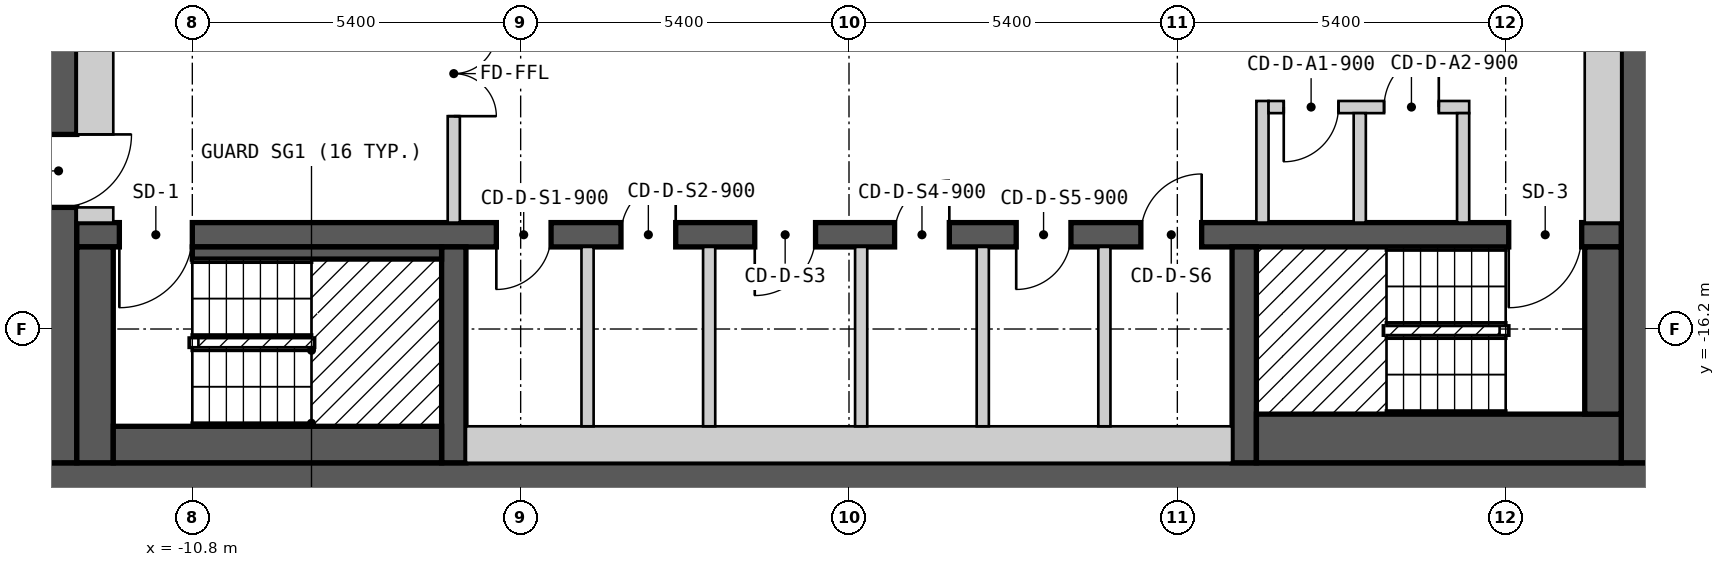
"""IFC4 building model, lengths in metres.
Left out: names, types, materials, properties, quantities, classifications, styles, units other than length and angle.
Written with IfcOpenShell. Run it as: python <this file> out.ifc"""

import sys

from ifc_helpers import new_model, si_unit, direction, frame, frame_2d, origin, place, context, subcontext, project, spatial, rectangle, extrude, element, fill, save


model = new_model("IFC4")
c1 = context("Model", 3, precision=1e-05, world=origin(), true_north=direction((0.0, 1.0)))
c2 = subcontext(c1, "Body", "Model", "MODEL_VIEW")
j1 = project(units=[si_unit("LENGTHUNIT", "METRE"), si_unit("PLANEANGLEUNIT", "RADIAN")], contexts=[c1])
p1 = place(None, origin())
s1 = spatial("IfcSite", under=j1, at=p1, CompositionType="ELEMENT")
p2 = place(p1, origin())
s2 = spatial("IfcBuilding", under=s1, at=p2, CompositionType="ELEMENT")
p3 = place(p2, frame((0.0, 0.0, 172.2)))
s3 = spatial("IfcBuildingStorey", under=s2, at=p3, CompositionType="ELEMENT", Elevation=172.2)
p4 = place(p3, frame((-13.3, -18.7, 0.0), z_axis=(0.0, 0.0, 1.0), x_axis=(1.0, 0.0, 0.0)))
e1 = element("IfcWall", 1, at=p4, inside=s3, PredefinedType="SHEAR", context=c2, shape_type="SweptSolid", body=[
    extrude(rectangle(XDim=26.6, YDim=0.6, at=frame_2d((13.3, 0.0))), origin(), (0.0, 0.0, 1.0), 2.7),
])
p5 = place(p3, frame((-13.0, -18.4, 0.0), z_axis=(0.0, 0.0, 1.0), x_axis=(0.0, 1.0, 0.0)))
e2 = element("IfcWall", 2, at=p5, inside=s3, PredefinedType="SHEAR", context=c2, shape_type="SweptSolid", body=[
    extrude(rectangle(XDim=12.8, YDim=0.6, at=frame_2d((6.4, 0.0))), origin(), (0.0, 0.0, 1.0), 2.7),
])
p6 = place(p5, frame((4.2, 0.0, 0.0)))
e3 = element("IfcOpeningElement", 3, at=p6, cuts=e2, PredefinedType="OPENING", context=c2, shape_type="SweptSolid", body=[
    extrude(rectangle(XDim=1.2, YDim=2.1, at=frame_2d((0.6, 1.05))), frame((0.0, 0.31, 0.0), z_axis=(0.0, -1.0, 0.0), x_axis=(1.0, 0.0, 0.0)), (0.0, 0.0, 1.0), 0.62),
])
p7 = place(p3, frame((13.0, -18.4, 0.0), z_axis=(0.0, 0.0, 1.0), x_axis=(0.0, 1.0, 0.0)))
e4 = element("IfcWall", 4, at=p7, inside=s3, PredefinedType="SHEAR", context=c2, shape_type="SweptSolid", body=[
    extrude(rectangle(XDim=12.8, YDim=0.6, at=frame_2d((6.4, 0.0))), origin(), (0.0, 0.0, 1.0), 2.7),
])
p8 = place(p3, frame((-12.7, -14.65, 0.0), z_axis=(0.0, 0.0, 1.0), x_axis=(1.0, 0.0, 0.0)))
e5 = element("IfcWall", 5, at=p8, inside=s3, PredefinedType="SHEAR", context=c2, shape_type="SweptSolid", body=[
    extrude(rectangle(XDim=25.4, YDim=0.4, at=frame_2d((12.7, 0.0))), origin(), (0.0, 0.0, 1.0), 2.7),
])
p9 = place(p8, frame((1.9, 0.0, 0.0), z_axis=(0.0, 0.0, 1.0), x_axis=(-1.0, 0.0, 0.0)))
e6 = element("IfcOpeningElement", 6, at=p9, cuts=e5, PredefinedType="OPENING", context=c2, shape_type="SweptSolid", body=[
    extrude(rectangle(XDim=1.2, YDim=2.1, at=frame_2d((0.6, 1.05))), frame((0.0, 0.21, 0.0), z_axis=(0.0, -1.0, 0.0), x_axis=(1.0, 0.0, 0.0)), (0.0, 0.0, 1.0), 0.42),
])
p10 = place(p8, frame((24.75, 0.0, 0.0), z_axis=(0.0, 0.0, 1.0), x_axis=(-1.0, 0.0, 0.0)))
e7 = element("IfcOpeningElement", 7, at=p10, cuts=e5, PredefinedType="OPENING", context=c2, shape_type="SweptSolid", body=[
    extrude(rectangle(XDim=1.2, YDim=2.1, at=frame_2d((0.6, 1.05))), frame((0.0, 0.21, 0.0), z_axis=(0.0, -1.0, 0.0), x_axis=(1.0, 0.0, 0.0)), (0.0, 0.0, 1.0), 0.42),
])
p11 = place(p8, frame((7.8, 0.0, 0.0), z_axis=(0.0, 0.0, 1.0), x_axis=(-1.0, 0.0, 0.0)))
e8 = element("IfcOpeningElement", 8, at=p11, cuts=e5, PredefinedType="OPENING", context=c2, shape_type="SweptSolid", body=[
    extrude(rectangle(XDim=0.9, YDim=2.1, at=frame_2d((0.45, 1.05))), frame((0.0, 0.21, 0.0), z_axis=(0.0, -1.0, 0.0), x_axis=(1.0, 0.0, 0.0)), (0.0, 0.0, 1.0), 0.42),
])
p12 = place(p8, frame((9.85, 0.0, 0.0), z_axis=(0.0, 0.0, 1.0), x_axis=(-1.0, 0.0, 0.0)))
e9 = element("IfcOpeningElement", 9, at=p12, cuts=e5, PredefinedType="OPENING", context=c2, shape_type="SweptSolid", body=[
    extrude(rectangle(XDim=0.9, YDim=2.1, at=frame_2d((0.45, 1.05))), frame((0.0, 0.21, 0.0), z_axis=(0.0, -1.0, 0.0), x_axis=(1.0, 0.0, 0.0)), (0.0, 0.0, 1.0), 0.42),
])
p13 = place(p8, frame((12.15, 0.0, 0.0), z_axis=(0.0, 0.0, 1.0), x_axis=(-1.0, 0.0, 0.0)))
e10 = element("IfcOpeningElement", 10, at=p13, cuts=e5, PredefinedType="OPENING", context=c2, shape_type="SweptSolid", body=[
    extrude(rectangle(XDim=1.0, YDim=2.1, at=frame_2d((0.5, 1.05))), frame((0.0, 0.21, 0.0), z_axis=(0.0, -1.0, 0.0), x_axis=(1.0, 0.0, 0.0)), (0.0, 0.0, 1.0), 0.42),
])
p14 = place(p8, frame((14.35, 0.0, 0.0), z_axis=(0.0, 0.0, 1.0), x_axis=(-1.0, 0.0, 0.0)))
e11 = element("IfcOpeningElement", 11, at=p14, cuts=e5, PredefinedType="OPENING", context=c2, shape_type="SweptSolid", body=[
    extrude(rectangle(XDim=0.9, YDim=2.1, at=frame_2d((0.45, 1.05))), frame((0.0, 0.21, 0.0), z_axis=(0.0, -1.0, 0.0), x_axis=(1.0, 0.0, 0.0)), (0.0, 0.0, 1.0), 0.42),
])
p15 = place(p8, frame((16.35, 0.0, 0.0), z_axis=(0.0, 0.0, 1.0), x_axis=(-1.0, 0.0, 0.0)))
e12 = element("IfcOpeningElement", 12, at=p15, cuts=e5, PredefinedType="OPENING", context=c2, shape_type="SweptSolid", body=[
    extrude(rectangle(XDim=0.9, YDim=2.1, at=frame_2d((0.45, 1.05))), frame((0.0, 0.21, 0.0), z_axis=(0.0, -1.0, 0.0), x_axis=(1.0, 0.0, 0.0)), (0.0, 0.0, 1.0), 0.42),
])
p16 = place(p8, frame((18.5, 0.0, 0.0), z_axis=(0.0, 0.0, 1.0), x_axis=(-1.0, 0.0, 0.0)))
e13 = element("IfcOpeningElement", 13, at=p16, cuts=e5, PredefinedType="OPENING", context=c2, shape_type="SweptSolid", body=[
    extrude(rectangle(XDim=1.0, YDim=2.1, at=frame_2d((0.5, 1.05))), frame((0.0, 0.21, 0.0), z_axis=(0.0, -1.0, 0.0), x_axis=(1.0, 0.0, 0.0)), (0.0, 0.0, 1.0), 0.42),
])
for number, where, z_axis, x_axis in (
    (14, (-6.5, -18.4, 0.0), (0.0, 0.0, 1.0), (0.0, 1.0, 0.0)),
    (15, (6.5, -18.4, 0.0), (0.0, 0.0, 1.0), (0.0, 1.0, 0.0)),
):
    element("IfcWall", number, at=place(p3, frame(where, z_axis=z_axis, x_axis=x_axis)), inside=s3, PredefinedType="SHEAR", context=c2, shape_type="SweptSolid", body=[
        extrude(rectangle(XDim=3.55, YDim=0.4, at=frame_2d((1.775, 0.0))), origin(), (0.0, 0.0, 1.0), 2.7),
    ])
p17 = place(p3, frame((-12.4, -18.4, 0.0), z_axis=(0.0, 0.0, 1.0), x_axis=(0.0, 1.0, 0.0)))
e16 = element("IfcWall", 16, at=p17, inside=s3, PredefinedType="SOLIDWALL", context=c2, shape_type="SweptSolid", body=[
    extrude(rectangle(XDim=3.55, YDim=0.6, at=frame_2d((1.775, 0.0))), origin(), (0.0, 0.0, 1.0), 2.7),
])
p18 = place(p3, frame((-12.7, -14.325, 0.0), z_axis=(0.0, 0.0, 1.0), x_axis=(1.0, 0.0, 0.0)))
e17 = element("IfcWall", 17, at=p18, inside=s3, PredefinedType="PARTITIONING", context=c2, shape_type="SweptSolid", body=[
    extrude(rectangle(XDim=0.6, YDim=0.25, at=frame_2d((0.3, 0.0))), origin(), (0.0, 0.0, 1.0), 2.7),
])
p19 = place(p3, frame((-12.4, -13.0, 0.0), z_axis=(0.0, 0.0, 1.0), x_axis=(0.0, 1.0, 0.0)))
e18 = element("IfcWall", 18, at=p19, inside=s3, PredefinedType="PARTITIONING", context=c2, shape_type="SweptSolid", body=[
    extrude(rectangle(XDim=3.45, YDim=0.6, at=frame_2d((1.725, 0.0))), origin(), (0.0, 0.0, 1.0), 2.7),
])
p20 = place(p3, frame((-12.1, -18.1, 0.0), z_axis=(0.0, 0.0, 1.0), x_axis=(1.0, 0.0, 0.0)))
e19 = element("IfcWall", 19, at=p20, inside=s3, PredefinedType="SOLIDWALL", context=c2, shape_type="SweptSolid", body=[
    extrude(rectangle(XDim=5.4, YDim=0.6, at=frame_2d((2.7, 0.0))), origin(), (0.0, 0.0, 1.0), 2.7),
])
p21 = place(p3, frame((-10.8, -14.95, 0.0), z_axis=(0.0, 0.0, 1.0), x_axis=(1.0, 0.0, 0.0)))
e20 = element("IfcWall", 20, at=p21, inside=s3, PredefinedType="SOLIDWALL", context=c2, shape_type="SweptSolid", body=[
    extrude(rectangle(XDim=4.1, YDim=0.2, at=frame_2d((2.05, 0.0))), origin(), (0.0, 0.0, 1.0), 2.7),
])
p22 = place(p3, frame((-6.5, -14.45, 0.0), z_axis=(0.0, 0.0, 1.0), x_axis=(0.0, 1.0, 0.0)))
e21 = element("IfcWall", 21, at=p22, inside=s3, PredefinedType="PARTITIONING", context=c2, shape_type="SweptSolid", body=[
    extrude(rectangle(XDim=4.9, YDim=0.2, at=frame_2d((2.45, 0.0))), origin(), (0.0, 0.0, 1.0), 2.7),
])
p23 = place(p22, frame((3.15, 0.0, 0.0), z_axis=(0.0, 0.0, 1.0), x_axis=(-1.0, 0.0, 0.0)))
e22 = element("IfcOpeningElement", 22, at=p23, cuts=e21, PredefinedType="OPENING", context=c2, shape_type="SweptSolid", body=[
    extrude(rectangle(XDim=1.4, YDim=2.1, at=frame_2d((0.7, 1.05))), frame((0.0, 0.11, 0.0), z_axis=(0.0, -1.0, 0.0), x_axis=(1.0, 0.0, 0.0)), (0.0, 0.0, 1.0), 0.22),
])
p24 = place(p3, frame((-6.3, -18.1, 0.0), z_axis=(0.0, 0.0, 1.0), x_axis=(1.0, 0.0, 0.0)))
e23 = element("IfcWall", 23, at=p24, inside=s3, PredefinedType="PARTITIONING", context=c2, shape_type="SweptSolid", body=[
    extrude(rectangle(XDim=12.6, YDim=0.6, at=frame_2d((6.3, 0.0))), origin(), (0.0, 0.0, 1.0), 2.7),
])
for number, where, z_axis, x_axis in (
    (24, (-4.3, -17.8, 0.0), (0.0, 0.0, 1.0), (0.0, 1.0, 0.0)),
    (25, (-2.3, -17.8, 0.0), (0.0, 0.0, 1.0), (0.0, 1.0, 0.0)),
    (26, (0.2, -17.8, 0.0), (0.0, 0.0, 1.0), (0.0, 1.0, 0.0)),
    (27, (2.2, -17.8, 0.0), (0.0, 0.0, 1.0), (0.0, 1.0, 0.0)),
    (28, (4.2, -17.8, 0.0), (0.0, 0.0, 1.0), (0.0, 1.0, 0.0)),
):
    element("IfcWall", number, at=place(p3, frame(where, z_axis=z_axis, x_axis=x_axis)), inside=s3, PredefinedType="PARTITIONING", context=c2, shape_type="SweptSolid", body=[
        extrude(rectangle(XDim=2.95, YDim=0.2, at=frame_2d((1.475, 0.0))), origin(), (0.0, 0.0, 1.0), 2.7),
    ])
p25 = place(p3, frame((6.7, -18.0, 0.0), z_axis=(0.0, 0.0, 1.0), x_axis=(1.0, 0.0, 0.0)))
e29 = element("IfcWall", 29, at=p25, inside=s3, PredefinedType="SOLIDWALL", context=c2, shape_type="SweptSolid", body=[
    extrude(rectangle(XDim=6.0, YDim=0.8, at=frame_2d((3.0, 0.0))), origin(), (0.0, 0.0, 1.0), 2.7),
])
p26 = place(p3, frame((6.8, -14.45, 0.0), z_axis=(0.0, 0.0, 1.0), x_axis=(0.0, 1.0, 0.0)))
e30 = element("IfcWall", 30, at=p26, inside=s3, PredefinedType="PARTITIONING", context=c2, shape_type="SweptSolid", body=[
    extrude(rectangle(XDim=2.0, YDim=0.2, at=frame_2d((1.0, 0.0))), origin(), (0.0, 0.0, 1.0), 2.7),
])
p27 = place(p3, frame((6.9, -12.55, 0.0), z_axis=(0.0, 0.0, 1.0), x_axis=(1.0, 0.0, 0.0)))
e31 = element("IfcWall", 31, at=p27, inside=s3, PredefinedType="PARTITIONING", context=c2, shape_type="SweptSolid", body=[
    extrude(rectangle(XDim=3.3, YDim=0.2, at=frame_2d((1.65, 0.0))), origin(), (0.0, 0.0, 1.0), 2.7),
])
p28 = place(p27, frame((1.15, 0.0, 0.0), z_axis=(0.0, 0.0, 1.0), x_axis=(-1.0, 0.0, 0.0)))
e32 = element("IfcOpeningElement", 32, at=p28, cuts=e31, PredefinedType="OPENING", context=c2, shape_type="SweptSolid", body=[
    extrude(rectangle(XDim=0.9, YDim=2.1, at=frame_2d((0.45, 1.05))), frame((0.0, 0.11, 0.0), z_axis=(0.0, -1.0, 0.0), x_axis=(1.0, 0.0, 0.0)), (0.0, 0.0, 1.0), 0.22),
])
p29 = place(p27, frame((2.8, 0.0, 0.0), z_axis=(0.0, 0.0, 1.0), x_axis=(-1.0, 0.0, 0.0)))
e33 = element("IfcOpeningElement", 33, at=p29, cuts=e31, PredefinedType="OPENING", context=c2, shape_type="SweptSolid", body=[
    extrude(rectangle(XDim=0.9, YDim=2.1, at=frame_2d((0.45, 1.05))), frame((0.0, 0.11, 0.0), z_axis=(0.0, -1.0, 0.0), x_axis=(1.0, 0.0, 0.0)), (0.0, 0.0, 1.0), 0.22),
])
for number, where, z_axis, x_axis in (
    (34, (8.4, -14.45, 0.0), (0.0, 0.0, 1.0), (0.0, 1.0, 0.0)),
    (35, (10.1, -14.45, 0.0), (0.0, 0.0, 1.0), (0.0, 1.0, 0.0)),
):
    element("IfcWall", number, at=place(p3, frame(where, z_axis=z_axis, x_axis=x_axis)), inside=s3, PredefinedType="PARTITIONING", context=c2, shape_type="SweptSolid", body=[
        extrude(rectangle(XDim=1.8, YDim=0.2, at=frame_2d((0.9, 0.0))), origin(), (0.0, 0.0, 1.0), 2.7),
    ])
p30 = place(p3, frame((12.4, -17.6, 0.0), z_axis=(0.0, 0.0, 1.0), x_axis=(0.0, 1.0, 0.0)))
e36 = element("IfcWall", 36, at=p30, inside=s3, PredefinedType="SOLIDWALL", context=c2, shape_type="SweptSolid", body=[
    extrude(rectangle(XDim=2.75, YDim=0.6, at=frame_2d((1.375, 0.0))), origin(), (0.0, 0.0, 1.0), 2.7),
])
p31 = place(p3, frame((12.4, -14.45, 0.0), z_axis=(0.0, 0.0, 1.0), x_axis=(0.0, 1.0, 0.0)))
e37 = element("IfcWall", 37, at=p31, inside=s3, PredefinedType="PARTITIONING", context=c2, shape_type="SweptSolid", body=[
    extrude(rectangle(XDim=8.25, YDim=0.6, at=frame_2d((4.125, 0.0))), origin(), (0.0, 0.0, 1.0), 2.7),
])
p32 = place(p9, origin())
e38 = element("IfcDoor", 38, at=p32, inside=s3, OperationType="SINGLE_SWING_RIGHT", PredefinedType="DOOR", context=c2, shape_type="SweptSolid", body=[
    extrude(rectangle(XDim=1.2, YDim=2.1, at=frame_2d((0.6, 1.05))), frame((0.0, 0.025, 0.0), z_axis=(0.0, -1.0, 0.0), x_axis=(1.0, 0.0, 0.0)), (0.0, 0.0, 1.0), 0.05),
])
fill(e6, e38)
p33 = place(p10, origin())
e39 = element("IfcDoor", 39, at=p33, inside=s3, OperationType="SINGLE_SWING_RIGHT", PredefinedType="DOOR", context=c2, shape_type="SweptSolid", body=[
    extrude(rectangle(XDim=1.2, YDim=2.1, at=frame_2d((0.6, 1.05))), frame((0.0, 0.025, 0.0), z_axis=(0.0, -1.0, 0.0), x_axis=(1.0, 0.0, 0.0)), (0.0, 0.0, 1.0), 0.05),
])
fill(e7, e39)
p34 = place(p6, origin())
e40 = element("IfcDoor", 40, at=p34, inside=s3, OperationType="SINGLE_SWING_RIGHT", PredefinedType="DOOR", context=c2, shape_type="SweptSolid", body=[
    extrude(rectangle(XDim=1.2, YDim=2.1, at=frame_2d((0.6, 1.05))), frame((0.0, 0.025, 0.0), z_axis=(0.0, -1.0, 0.0), x_axis=(1.0, 0.0, 0.0)), (0.0, 0.0, 1.0), 0.05),
])
fill(e3, e40)
p35 = place(p23, origin())
e41 = element("IfcDoor", 41, at=p35, inside=s3, OperationType="DOUBLE_DOOR_SINGLE_SWING", PredefinedType="DOOR", context=c2, shape_type="SweptSolid", body=[
    extrude(rectangle(XDim=1.4, YDim=2.1, at=frame_2d((0.7, 1.05))), frame((0.0, 0.025, 0.0), z_axis=(0.0, -1.0, 0.0), x_axis=(1.0, 0.0, 0.0)), (0.0, 0.0, 1.0), 0.05),
])
fill(e22, e41)
p36 = place(p28, origin())
e42 = element("IfcDoor", 42, at=p36, inside=s3, OperationType="SINGLE_SWING_RIGHT", PredefinedType="DOOR", context=c2, shape_type="SweptSolid", body=[
    extrude(rectangle(XDim=0.9, YDim=2.1, at=frame_2d((0.45, 1.05))), frame((0.0, 0.025, 0.0), z_axis=(0.0, -1.0, 0.0), x_axis=(1.0, 0.0, 0.0)), (0.0, 0.0, 1.0), 0.05),
])
fill(e32, e42)
p37 = place(p29, origin())
e43 = element("IfcDoor", 43, at=p37, inside=s3, OperationType="SINGLE_SWING_LEFT", PredefinedType="DOOR", context=c2, shape_type="SweptSolid", body=[
    extrude(rectangle(XDim=0.9, YDim=2.1, at=frame_2d((0.45, 1.05))), frame((0.0, 0.025, 0.0), z_axis=(0.0, -1.0, 0.0), x_axis=(1.0, 0.0, 0.0)), (0.0, 0.0, 1.0), 0.05),
])
fill(e33, e43)
p38 = place(p11, origin())
e44 = element("IfcDoor", 44, at=p38, inside=s3, OperationType="SINGLE_SWING_RIGHT", PredefinedType="DOOR", context=c2, shape_type="SweptSolid", body=[
    extrude(rectangle(XDim=0.9, YDim=2.1, at=frame_2d((0.45, 1.05))), frame((0.0, 0.025, 0.0), z_axis=(0.0, -1.0, 0.0), x_axis=(1.0, 0.0, 0.0)), (0.0, 0.0, 1.0), 0.05),
])
fill(e8, e44)
p39 = place(p12, origin())
e45 = element("IfcDoor", 45, at=p39, inside=s3, OperationType="SINGLE_SWING_LEFT", PredefinedType="DOOR", context=c2, shape_type="SweptSolid", body=[
    extrude(rectangle(XDim=0.9, YDim=2.1, at=frame_2d((0.45, 1.05))), frame((0.0, 0.025, 0.0), z_axis=(0.0, -1.0, 0.0), x_axis=(1.0, 0.0, 0.0)), (0.0, 0.0, 1.0), 0.05),
])
fill(e9, e45)
p40 = place(p13, origin())
e46 = element("IfcDoor", 46, at=p40, inside=s3, OperationType="SINGLE_SWING_RIGHT", PredefinedType="DOOR", context=c2, shape_type="SweptSolid", body=[
    extrude(rectangle(XDim=1.0, YDim=2.1, at=frame_2d((0.5, 1.05))), frame((0.0, 0.025, 0.0), z_axis=(0.0, -1.0, 0.0), x_axis=(1.0, 0.0, 0.0)), (0.0, 0.0, 1.0), 0.05),
])
fill(e10, e46)
p41 = place(p14, origin())
e47 = element("IfcDoor", 47, at=p41, inside=s3, OperationType="SINGLE_SWING_LEFT", PredefinedType="DOOR", context=c2, shape_type="SweptSolid", body=[
    extrude(rectangle(XDim=0.9, YDim=2.1, at=frame_2d((0.45, 1.05))), frame((0.0, 0.025, 0.0), z_axis=(0.0, -1.0, 0.0), x_axis=(1.0, 0.0, 0.0)), (0.0, 0.0, 1.0), 0.05),
])
fill(e11, e47)
p42 = place(p15, origin())
e48 = element("IfcDoor", 48, at=p42, inside=s3, OperationType="SINGLE_SWING_RIGHT", PredefinedType="DOOR", context=c2, shape_type="SweptSolid", body=[
    extrude(rectangle(XDim=0.9, YDim=2.1, at=frame_2d((0.45, 1.05))), frame((0.0, 0.025, 0.0), z_axis=(0.0, -1.0, 0.0), x_axis=(1.0, 0.0, 0.0)), (0.0, 0.0, 1.0), 0.05),
])
fill(e12, e48)
p43 = place(p16, origin())
e49 = element("IfcDoor", 49, at=p43, inside=s3, OperationType="SINGLE_SWING_LEFT", PredefinedType="DOOR", context=c2, shape_type="SweptSolid", body=[
    extrude(rectangle(XDim=1.0, YDim=2.1, at=frame_2d((0.5, 1.05))), frame((0.0, 0.025, 0.0), z_axis=(0.0, -1.0, 0.0), x_axis=(1.0, 0.0, 0.0)), (0.0, 0.0, 1.0), 0.05),
])
fill(e13, e49)
save(model, sys.argv[1])
